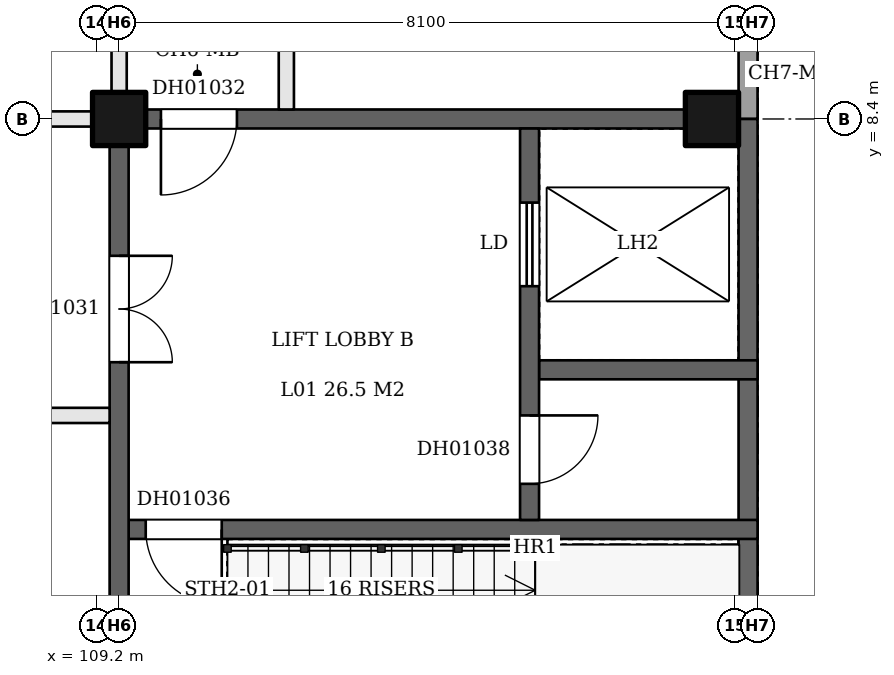
"""IFC4 building model, lengths in metres.
Left out: names, types, materials, properties, quantities, classifications, styles, units other than length and angle.
Written with IfcOpenShell. Run it as: python <this file> out.ifc"""

import sys

from ifc_helpers import new_model, si_unit, direction, frame, frame_2d, origin, origin_2d, place, context, subcontext, project, spatial, rectangle, extrude, element, fill, save


model = new_model("IFC4")
c1 = context("Model", 3, precision=1e-05, world=origin(), true_north=direction((0.0, 1.0)))
c2 = subcontext(c1, "Body", "Model", "MODEL_VIEW")
j1 = project(units=[si_unit("LENGTHUNIT", "METRE"), si_unit("PLANEANGLEUNIT", "RADIAN")], contexts=[c1])
p1 = place(None, origin())
s1 = spatial("IfcSite", under=j1, at=p1, CompositionType="ELEMENT")
p2 = place(p1, origin())
s2 = spatial("IfcBuilding", under=s1, at=p2, CompositionType="ELEMENT")
p3 = place(p2, frame((0.0, 0.0, 9.0)))
s3 = spatial("IfcBuildingStorey", under=s2, at=p3, CompositionType="ELEMENT", Elevation=9.0)
for number, where, z_axis, x_axis in (
    (1, (109.5, 8.4, 0.0), (0.0, 0.0, 1.0), (1.0, 0.0, 0.0)),
    (2, (117.3, 8.4, 0.0), (0.0, 0.0, 1.0), (1.0, 0.0, 0.0)),
):
    element("IfcColumn", number, at=place(p3, frame(where, z_axis=z_axis, x_axis=x_axis)), inside=s3, PredefinedType="COLUMN", context=c2, shape_type="SweptSolid", body=[
        extrude(rectangle(XDim=0.7, YDim=0.7, at=origin_2d()), origin(), (0.0, 0.0, 1.0), 5.1),
    ])
p4 = place(p3, frame((109.625, 3.0, 0.0), z_axis=(0.0, 0.0, 1.0), x_axis=(1.0, 0.0, 0.0)))
e3 = element("IfcWall", 3, at=p4, inside=s3, PredefinedType="SHEAR", context=c2, shape_type="SweptSolid", body=[
    extrude(rectangle(XDim=8.275, YDim=0.25, at=frame_2d((4.137, 0.0))), origin(), (0.0, 0.0, 1.0), 5.1),
])
p5 = place(p4, frame((0.225, 0.0, 0.0)))
e4 = element("IfcOpeningElement", 4, at=p5, cuts=e3, PredefinedType="OPENING", context=c2, shape_type="SweptSolid", body=[
    extrude(rectangle(XDim=1.0, YDim=2.1, at=frame_2d((0.5, 1.05))), frame((0.0, 0.135, 0.0), z_axis=(0.0, -1.0, 0.0), x_axis=(1.0, 0.0, 0.0)), (0.0, 0.0, 1.0), 0.27),
])
p6 = place(p3, frame((68.35, 4.5, 0.0), z_axis=(0.0, 0.0, 1.0), x_axis=(1.0, 0.0, 0.0)))
e5 = element("IfcWall", 5, at=p6, inside=s3, PredefinedType="PARTITIONING", context=c2, shape_type="SweptSolid", body=[
    extrude(rectangle(XDim=41.025, YDim=0.2, at=frame_2d((20.512, 0.0))), origin(), (0.0, 0.0, 1.0), 5.1),
])
p7 = place(p6, frame((1.65, 0.0, 0.0)))
e6 = element("IfcOpeningElement", 6, at=p7, cuts=e5, PredefinedType="OPENING", context=c2, shape_type="SweptSolid", body=[
    extrude(rectangle(XDim=1.0, YDim=2.1, at=frame_2d((0.5, 1.05))), frame((0.0, 0.11, 0.0), z_axis=(0.0, -1.0, 0.0), x_axis=(1.0, 0.0, 0.0)), (0.0, 0.0, 1.0), 0.22),
])
p8 = place(p6, frame((7.65, 0.0, 0.0)))
e7 = element("IfcOpeningElement", 7, at=p8, cuts=e5, PredefinedType="OPENING", context=c2, shape_type="SweptSolid", body=[
    extrude(rectangle(XDim=1.0, YDim=2.1, at=frame_2d((0.5, 1.05))), frame((0.0, 0.11, 0.0), z_axis=(0.0, -1.0, 0.0), x_axis=(1.0, 0.0, 0.0)), (0.0, 0.0, 1.0), 0.22),
])
p9 = place(p6, frame((13.65, 0.0, 0.0)))
e8 = element("IfcOpeningElement", 8, at=p9, cuts=e5, PredefinedType="OPENING", context=c2, shape_type="SweptSolid", body=[
    extrude(rectangle(XDim=1.0, YDim=2.1, at=frame_2d((0.5, 1.05))), frame((0.0, 0.11, 0.0), z_axis=(0.0, -1.0, 0.0), x_axis=(1.0, 0.0, 0.0)), (0.0, 0.0, 1.0), 0.22),
])
p10 = place(p6, frame((19.65, 0.0, 0.0)))
e9 = element("IfcOpeningElement", 9, at=p10, cuts=e5, PredefinedType="OPENING", context=c2, shape_type="SweptSolid", body=[
    extrude(rectangle(XDim=1.0, YDim=2.1, at=frame_2d((0.5, 1.05))), frame((0.0, 0.11, 0.0), z_axis=(0.0, -1.0, 0.0), x_axis=(1.0, 0.0, 0.0)), (0.0, 0.0, 1.0), 0.22),
])
p11 = place(p6, frame((25.65, 0.0, 0.0)))
e10 = element("IfcOpeningElement", 10, at=p11, cuts=e5, PredefinedType="OPENING", context=c2, shape_type="SweptSolid", body=[
    extrude(rectangle(XDim=1.0, YDim=2.1, at=frame_2d((0.5, 1.05))), frame((0.0, 0.11, 0.0), z_axis=(0.0, -1.0, 0.0), x_axis=(1.0, 0.0, 0.0)), (0.0, 0.0, 1.0), 0.22),
])
p12 = place(p6, frame((31.65, 0.0, 0.0)))
e11 = element("IfcOpeningElement", 11, at=p12, cuts=e5, PredefinedType="OPENING", context=c2, shape_type="SweptSolid", body=[
    extrude(rectangle(XDim=1.0, YDim=2.1, at=frame_2d((0.5, 1.05))), frame((0.0, 0.11, 0.0), z_axis=(0.0, -1.0, 0.0), x_axis=(1.0, 0.0, 0.0)), (0.0, 0.0, 1.0), 0.22),
])
p13 = place(p6, frame((37.65, 0.0, 0.0)))
e12 = element("IfcOpeningElement", 12, at=p13, cuts=e5, PredefinedType="OPENING", context=c2, shape_type="SweptSolid", body=[
    extrude(rectangle(XDim=1.0, YDim=2.1, at=frame_2d((0.5, 1.05))), frame((0.0, 0.11, 0.0), z_axis=(0.0, -1.0, 0.0), x_axis=(1.0, 0.0, 0.0)), (0.0, 0.0, 1.0), 0.22),
])
p14 = place(p3, frame((115.025, 5.1, 0.0), z_axis=(0.0, 0.0, 1.0), x_axis=(1.0, 0.0, 0.0)))
e13 = element("IfcWall", 13, at=p14, inside=s3, PredefinedType="SHEAR", context=c2, shape_type="SweptSolid", body=[
    extrude(rectangle(XDim=2.875, YDim=0.25, at=frame_2d((1.438, 0.0))), origin(), (0.0, 0.0, 1.0), 5.1),
])
p15 = place(p3, frame((101.45, 8.4, 0.0), z_axis=(0.0, 0.0, 1.0), x_axis=(1.0, 0.0, 0.0)))
e14 = element("IfcWall", 14, at=p15, inside=s3, PredefinedType="PARTITIONING", context=c2, shape_type="SweptSolid", body=[
    extrude(rectangle(XDim=7.7, YDim=0.2, at=frame_2d((3.85, 0.0))), origin(), (0.0, 0.0, 1.0), 5.1),
])
p16 = place(p15, frame((2.15, 0.0, 0.0)))
e15 = element("IfcOpeningElement", 15, at=p16, cuts=e14, PredefinedType="OPENING", context=c2, shape_type="SweptSolid", body=[
    extrude(rectangle(XDim=1.0, YDim=2.1, at=frame_2d((0.5, 1.05))), frame((0.0, 0.11, 0.0), z_axis=(0.0, -1.0, 0.0), x_axis=(1.0, 0.0, 0.0)), (0.0, 0.0, 1.0), 0.22),
])
p17 = place(p15, frame((5.15, 0.0, 0.0)))
e16 = element("IfcOpeningElement", 16, at=p17, cuts=e14, PredefinedType="OPENING", context=c2, shape_type="SweptSolid", body=[
    extrude(rectangle(XDim=1.0, YDim=2.1, at=frame_2d((0.5, 1.05))), frame((0.0, 0.11, 0.0), z_axis=(0.0, -1.0, 0.0), x_axis=(1.0, 0.0, 0.0)), (0.0, 0.0, 1.0), 0.22),
])
p18 = place(p3, frame((109.85, 8.4, 0.0), z_axis=(0.0, 0.0, 1.0), x_axis=(1.0, 0.0, 0.0)))
e17 = element("IfcWall", 17, at=p18, inside=s3, PredefinedType="SHEAR", context=c2, shape_type="SweptSolid", body=[
    extrude(rectangle(XDim=7.1, YDim=0.25, at=frame_2d((3.55, 0.0))), origin(), (0.0, 0.0, 1.0), 5.1),
])
p19 = place(p18, frame((0.2, 0.0, 0.0)))
e18 = element("IfcOpeningElement", 18, at=p19, cuts=e17, PredefinedType="OPENING", context=c2, shape_type="SweptSolid", body=[
    extrude(rectangle(XDim=1.0, YDim=2.1, at=frame_2d((0.5, 1.05))), frame((0.0, 0.135, 0.0), z_axis=(0.0, -1.0, 0.0), x_axis=(1.0, 0.0, 0.0)), (0.0, 0.0, 1.0), 0.27),
])
p20 = place(p3, frame((109.5, 0.95, 0.0), z_axis=(0.0, 0.0, 1.0), x_axis=(0.0, 1.0, 0.0)))
e19 = element("IfcWall", 19, at=p20, inside=s3, PredefinedType="SHEAR", context=c2, shape_type="SweptSolid", body=[
    extrude(rectangle(XDim=7.1, YDim=0.25, at=frame_2d((3.55, 0.0))), origin(), (0.0, 0.0, 1.0), 5.1),
])
p21 = place(p20, frame((4.25, 0.0, 0.0)))
e20 = element("IfcOpeningElement", 20, at=p21, cuts=e19, PredefinedType="OPENING", context=c2, shape_type="SweptSolid", body=[
    extrude(rectangle(XDim=1.4, YDim=2.1, at=frame_2d((0.7, 1.05))), frame((0.0, 0.135, 0.0), z_axis=(0.0, -1.0, 0.0), x_axis=(1.0, 0.0, 0.0)), (0.0, 0.0, 1.0), 0.27),
])
p22 = place(p3, frame((109.5, 8.75, 0.0), z_axis=(0.0, 0.0, 1.0), x_axis=(0.0, 1.0, 0.0)))
e21 = element("IfcWall", 21, at=p22, inside=s3, PredefinedType="PARTITIONING", context=c2, shape_type="SweptSolid", body=[
    extrude(rectangle(XDim=7.7, YDim=0.2, at=frame_2d((3.85, 0.0))), origin(), (0.0, 0.0, 1.0), 5.1),
])
p23 = place(p3, frame((111.7, 8.525, 0.0), z_axis=(0.0, 0.0, 1.0), x_axis=(0.0, 1.0, 0.0)))
e22 = element("IfcWall", 22, at=p23, inside=s3, PredefinedType="PARTITIONING", context=c2, shape_type="SweptSolid", body=[
    extrude(rectangle(XDim=16.675, YDim=0.2, at=frame_2d((8.337, 0.0))), origin(), (0.0, 0.0, 1.0), 5.1),
])
p24 = place(p23, frame((3.637, 0.0, 0.0)))
e23 = element("IfcOpeningElement", 23, at=p24, cuts=e22, PredefinedType="OPENING", context=c2, shape_type="SweptSolid", body=[
    extrude(rectangle(XDim=1.0, YDim=2.1, at=frame_2d((0.5, 1.05))), frame((0.0, 0.11, 0.0), z_axis=(0.0, -1.0, 0.0), x_axis=(1.0, 0.0, 0.0)), (0.0, 0.0, 1.0), 0.22),
])
p25 = place(p23, frame((11.975, 0.0, 0.0)))
e24 = element("IfcOpeningElement", 24, at=p25, cuts=e22, PredefinedType="OPENING", context=c2, shape_type="SweptSolid", body=[
    extrude(rectangle(XDim=1.0, YDim=2.1, at=frame_2d((0.5, 1.05))), frame((0.0, 0.11, 0.0), z_axis=(0.0, -1.0, 0.0), x_axis=(1.0, 0.0, 0.0)), (0.0, 0.0, 1.0), 0.22),
])
p26 = place(p3, frame((114.9, 3.125, 0.0), z_axis=(0.0, 0.0, 1.0), x_axis=(0.0, 1.0, 0.0)))
e25 = element("IfcWall", 25, at=p26, inside=s3, PredefinedType="SHEAR", context=c2, shape_type="SweptSolid", body=[
    extrude(rectangle(XDim=5.15, YDim=0.25, at=frame_2d((2.575, 0.0))), origin(), (0.0, 0.0, 1.0), 5.1),
])
p27 = place(p26, frame((3.075, 0.0, 0.0)))
e26 = element("IfcOpeningElement", 26, at=p27, cuts=e25, PredefinedType="OPENING", context=c2, shape_type="SweptSolid", body=[
    extrude(rectangle(XDim=1.1, YDim=2.1, at=frame_2d((0.55, 1.05))), frame((0.0, 0.135, 0.0), z_axis=(0.0, -1.0, 0.0), x_axis=(1.0, 0.0, 0.0)), (0.0, 0.0, 1.0), 0.27),
])
p28 = place(p26, frame((0.475, 0.0, 0.0)))
e27 = element("IfcOpeningElement", 27, at=p28, cuts=e25, PredefinedType="OPENING", context=c2, shape_type="SweptSolid", body=[
    extrude(rectangle(XDim=0.9, YDim=2.1, at=frame_2d((0.45, 1.05))), frame((0.0, 0.135, 0.0), z_axis=(0.0, -1.0, 0.0), x_axis=(1.0, 0.0, 0.0)), (0.0, 0.0, 1.0), 0.27),
])
p29 = place(p3, frame((117.775, 0.0, 0.0), z_axis=(0.0, 0.0, 1.0), x_axis=(0.0, 1.0, 0.0)))
e28 = element("IfcWall", 28, at=p29, inside=s3, PredefinedType="SHEAR", context=c2, shape_type="SweptSolid", body=[
    extrude(rectangle(XDim=8.4, YDim=0.25, at=frame_2d((4.2, 0.0))), origin(), (0.0, 0.0, 1.0), 5.1),
])
p30 = place(p3, frame((117.775, 8.4, 0.0), z_axis=(0.0, 0.0, 1.0), x_axis=(0.0, 1.0, 0.0)))
e29 = element("IfcWall", 29, at=p30, inside=s3, PredefinedType="SOLIDWALL", context=c2, shape_type="SweptSolid", body=[
    extrude(rectangle(XDim=16.8, YDim=0.25, at=frame_2d((8.4, 0.0))), origin(), (0.0, 0.0, 1.0), 5.1),
])
p31 = place(p21, frame((1.4, 0.0, 0.0), z_axis=(0.0, 0.0, 1.0), x_axis=(-1.0, 0.0, 0.0)))
e30 = element("IfcDoor", 30, at=p31, inside=s3, OperationType="DOUBLE_DOOR_SINGLE_SWING", PredefinedType="DOOR", context=c2, shape_type="SweptSolid", body=[
    extrude(rectangle(XDim=1.4, YDim=2.1, at=frame_2d((0.7, 1.05))), frame((0.0, 0.025, 0.0), z_axis=(0.0, -1.0, 0.0), x_axis=(1.0, 0.0, 0.0)), (0.0, 0.0, 1.0), 0.05),
])
fill(e20, e30)
p32 = place(p19, frame((1.0, 0.0, 0.0), z_axis=(0.0, 0.0, 1.0), x_axis=(-1.0, 0.0, 0.0)))
e31 = element("IfcDoor", 31, at=p32, inside=s3, OperationType="SINGLE_SWING_RIGHT", PredefinedType="DOOR", context=c2, shape_type="SweptSolid", body=[
    extrude(rectangle(XDim=1.0, YDim=2.1, at=frame_2d((0.5, 1.05))), frame((0.0, 0.025, 0.0), z_axis=(0.0, -1.0, 0.0), x_axis=(1.0, 0.0, 0.0)), (0.0, 0.0, 1.0), 0.05),
])
fill(e18, e31)
p33 = place(p5, frame((1.0, 0.0, 0.0), z_axis=(0.0, 0.0, 1.0), x_axis=(-1.0, 0.0, 0.0)))
e32 = element("IfcDoor", 32, at=p33, inside=s3, OperationType="SINGLE_SWING_LEFT", PredefinedType="DOOR", context=c2, shape_type="SweptSolid", body=[
    extrude(rectangle(XDim=1.0, YDim=2.1, at=frame_2d((0.5, 1.05))), frame((0.0, 0.025, 0.0), z_axis=(0.0, -1.0, 0.0), x_axis=(1.0, 0.0, 0.0)), (0.0, 0.0, 1.0), 0.05),
])
fill(e4, e32)
p34 = place(p27, origin())
e33 = element("IfcDoor", 33, at=p34, inside=s3, OperationType="SLIDING_TO_LEFT", PredefinedType="DOOR", context=c2, shape_type="SweptSolid", body=[
    extrude(rectangle(XDim=1.1, YDim=2.1, at=frame_2d((0.55, 1.05))), frame((0.0, 0.025, 0.0), z_axis=(0.0, -1.0, 0.0), x_axis=(1.0, 0.0, 0.0)), (0.0, 0.0, 1.0), 0.05),
])
fill(e26, e33)
p35 = place(p28, frame((0.9, 0.0, 0.0), z_axis=(0.0, 0.0, 1.0), x_axis=(-1.0, 0.0, 0.0)))
e34 = element("IfcDoor", 34, at=p35, inside=s3, OperationType="SINGLE_SWING_LEFT", PredefinedType="DOOR", context=c2, shape_type="SweptSolid", body=[
    extrude(rectangle(XDim=0.9, YDim=2.1, at=frame_2d((0.45, 1.05))), frame((0.0, 0.025, 0.0), z_axis=(0.0, -1.0, 0.0), x_axis=(1.0, 0.0, 0.0)), (0.0, 0.0, 1.0), 0.05),
])
fill(e27, e34)
save(model, sys.argv[1])
